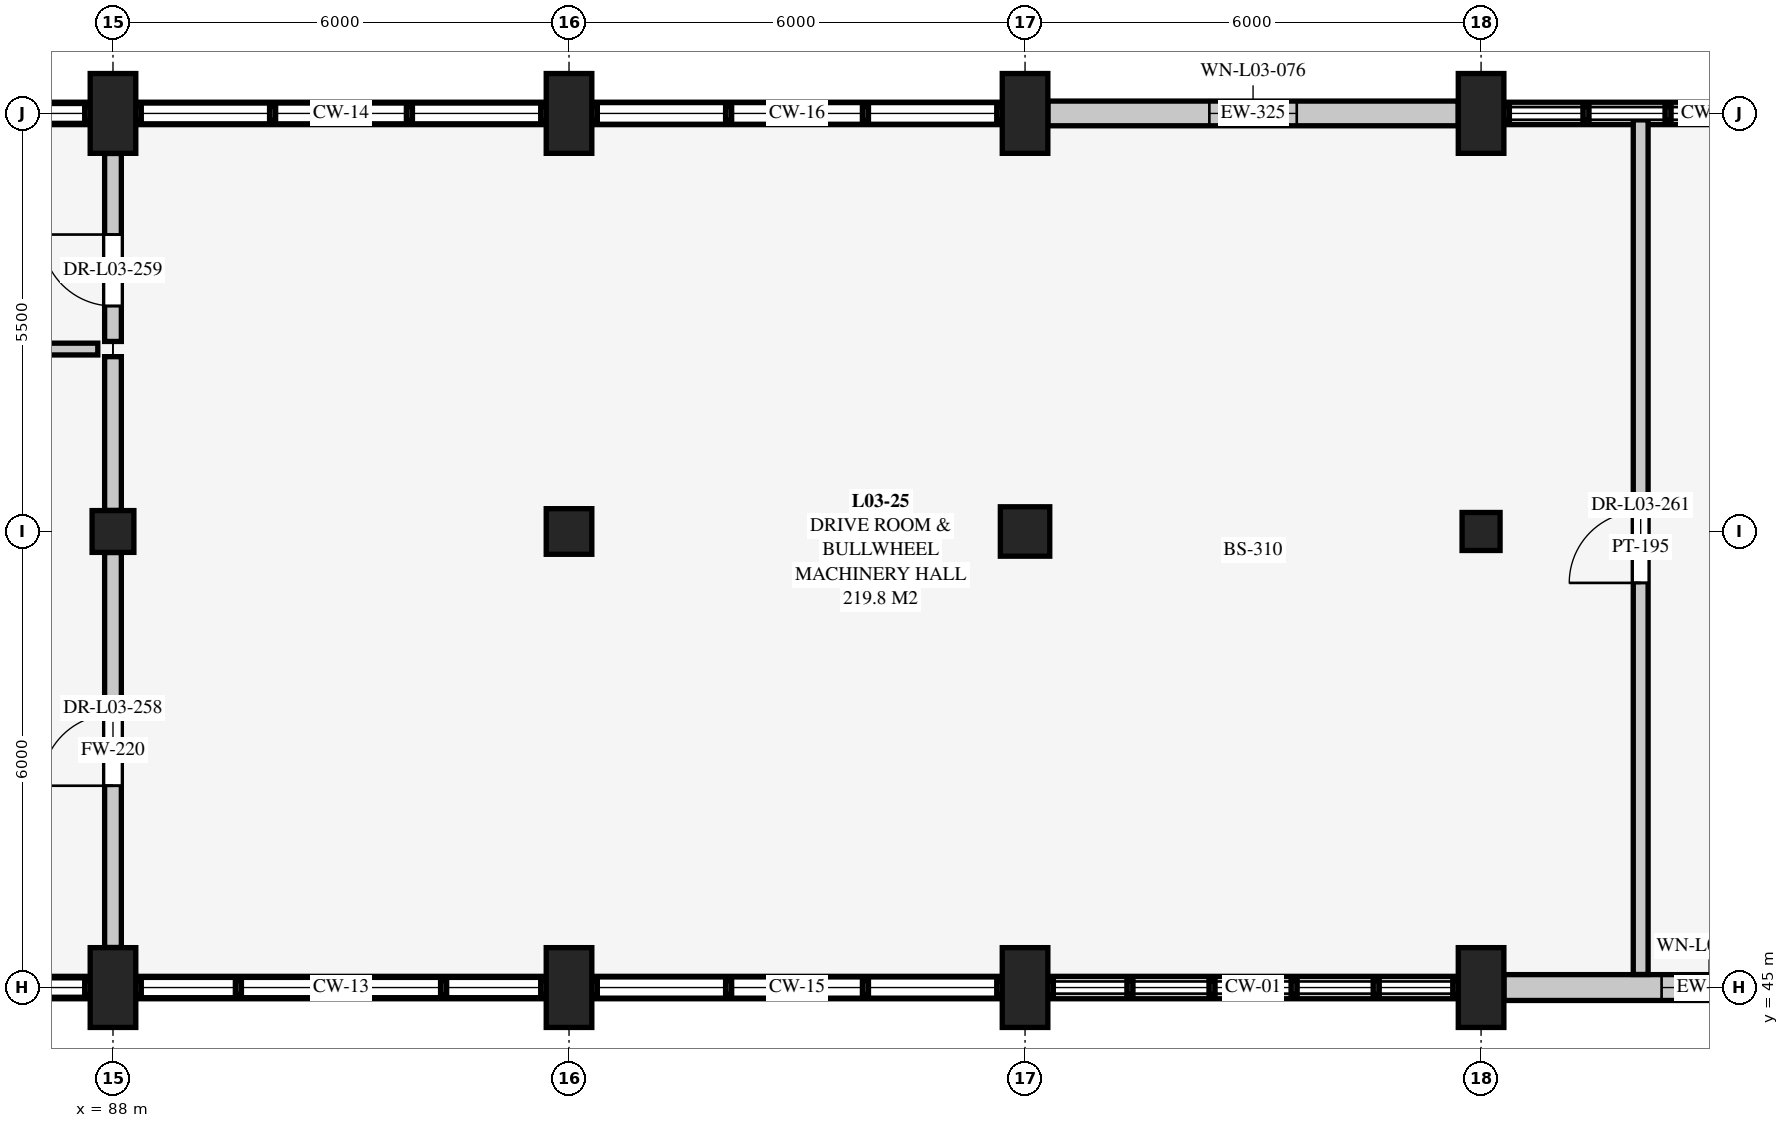
"""IFC4 building model, lengths in metres.
Left out: names, types, materials, properties, quantities, classifications, styles, units other than length and angle.
Written with IfcOpenShell. Run it as: python <this file> out.ifc"""

import sys

from ifc_helpers import new_model, si_unit, direction, frame, frame_2d, origin, origin_2d, place, context, subcontext, project, spatial, rectangle, extrude, element, fill, save


model = new_model("IFC4")
c1 = context("Model", 3, precision=1e-05, world=origin(), true_north=direction((0.0, 1.0)))
c2 = subcontext(c1, "Body", "Model", "MODEL_VIEW")
j1 = project(units=[si_unit("LENGTHUNIT", "METRE"), si_unit("PLANEANGLEUNIT", "RADIAN")], contexts=[c1])
p1 = place(None, origin())
s1 = spatial("IfcSite", under=j1, at=p1, CompositionType="ELEMENT")
p2 = place(p1, origin())
s2 = spatial("IfcBuilding", under=s1, at=p2, CompositionType="ELEMENT")
p3 = place(p2, frame((0.0, 0.0, 9.0)))
s3 = spatial("IfcBuildingStorey", under=s2, at=p3, CompositionType="ELEMENT", Elevation=9.0)
p4 = place(p3, frame((88.0, 45.0, 0.0), z_axis=(0.0, 0.0, 1.0), x_axis=(1.0, 0.0, 0.0)))
e1 = element("IfcColumn", 1, at=p4, inside=s3, PredefinedType="PILASTER", context=c2, shape_type="SweptSolid", body=[
    extrude(rectangle(XDim=0.6, YDim=1.05, at=origin_2d()), origin(), (0.0, 0.0, 1.0), 4.5),
])
p5 = place(p3, frame((88.0, 51.0, 0.0), z_axis=(0.0, 0.0, 1.0), x_axis=(1.0, 0.0, 0.0)))
e2 = element("IfcColumn", 2, at=p5, inside=s3, PredefinedType="COLUMN", context=c2, shape_type="SweptSolid", body=[
    extrude(rectangle(XDim=0.55, YDim=0.55, at=origin_2d()), origin(), (0.0, 0.0, 1.0), 4.5),
])
for number, where, z_axis, x_axis in (
    (3, (88.0, 56.5, 0.0), (0.0, 0.0, 1.0), (1.0, 0.0, 0.0)),
    (4, (94.0, 45.0, 0.0), (0.0, 0.0, 1.0), (1.0, 0.0, 0.0)),
):
    element("IfcColumn", number, at=place(p3, frame(where, z_axis=z_axis, x_axis=x_axis)), inside=s3, PredefinedType="PILASTER", context=c2, shape_type="SweptSolid", body=[
        extrude(rectangle(XDim=0.6, YDim=1.05, at=origin_2d()), origin(), (0.0, 0.0, 1.0), 4.5),
    ])
p6 = place(p3, frame((94.0, 51.0, 0.0), z_axis=(0.0, 0.0, 1.0), x_axis=(1.0, 0.0, 0.0)))
e5 = element("IfcColumn", 5, at=p6, inside=s3, PredefinedType="COLUMN", context=c2, shape_type="SweptSolid", body=[
    extrude(rectangle(XDim=0.6, YDim=0.6, at=origin_2d()), origin(), (0.0, 0.0, 1.0), 4.5),
])
for number, where, z_axis, x_axis in (
    (6, (94.0, 56.5, 0.0), (0.0, 0.0, 1.0), (1.0, 0.0, 0.0)),
    (7, (100.0, 45.0, 0.0), (0.0, 0.0, 1.0), (1.0, 0.0, 0.0)),
):
    element("IfcColumn", number, at=place(p3, frame(where, z_axis=z_axis, x_axis=x_axis)), inside=s3, PredefinedType="PILASTER", context=c2, shape_type="SweptSolid", body=[
        extrude(rectangle(XDim=0.6, YDim=1.05, at=origin_2d()), origin(), (0.0, 0.0, 1.0), 4.5),
    ])
p7 = place(p3, frame((100.0, 51.0, 0.0), z_axis=(0.0, 0.0, 1.0), x_axis=(1.0, 0.0, 0.0)))
e8 = element("IfcColumn", 8, at=p7, inside=s3, PredefinedType="COLUMN", context=c2, shape_type="SweptSolid", body=[
    extrude(rectangle(XDim=0.65, YDim=0.65, at=origin_2d()), origin(), (0.0, 0.0, 1.0), 4.5),
])
for number, where, z_axis, x_axis in (
    (9, (100.0, 56.5, 0.0), (0.0, 0.0, 1.0), (1.0, 0.0, 0.0)),
    (10, (106.0, 45.0, 0.0), (0.0, 0.0, 1.0), (1.0, 0.0, 0.0)),
):
    element("IfcColumn", number, at=place(p3, frame(where, z_axis=z_axis, x_axis=x_axis)), inside=s3, PredefinedType="PILASTER", context=c2, shape_type="SweptSolid", body=[
        extrude(rectangle(XDim=0.6, YDim=1.05, at=origin_2d()), origin(), (0.0, 0.0, 1.0), 4.5),
    ])
p8 = place(p3, frame((106.0, 51.0, 0.0), z_axis=(0.0, 0.0, 1.0), x_axis=(1.0, 0.0, 0.0)))
e11 = element("IfcColumn", 11, at=p8, inside=s3, PredefinedType="COLUMN", context=c2, shape_type="SweptSolid", body=[
    extrude(rectangle(XDim=0.5, YDim=0.5, at=origin_2d()), origin(), (0.0, 0.0, 1.0), 4.5),
])
p9 = place(p3, frame((106.0, 56.5, 0.0), z_axis=(0.0, 0.0, 1.0), x_axis=(1.0, 0.0, 0.0)))
e12 = element("IfcColumn", 12, at=p9, inside=s3, PredefinedType="PILASTER", context=c2, shape_type="SweptSolid", body=[
    extrude(rectangle(XDim=0.6, YDim=1.05, at=origin_2d()), origin(), (0.0, 0.0, 1.0), 4.5),
])
p10 = place(p3, frame((87.7, 45.0, 0.0), z_axis=(0.0, 0.0, 1.0), x_axis=(-1.0, 0.0, 0.0)))
e13 = element("IfcWall", 13, at=p10, inside=s3, PredefinedType="SOLIDWALL", context=c2, shape_type="SweptSolid", body=[
    extrude(rectangle(XDim=5.4, YDim=0.295, at=frame_2d((2.7, 0.0))), origin(), (0.0, 0.0, 1.0), 0.26),
])
p11 = place(p3, frame((82.3, 56.5, 0.0), z_axis=(0.0, 0.0, 1.0), x_axis=(1.0, 0.0, 0.0)))
e14 = element("IfcWall", 14, at=p11, inside=s3, PredefinedType="SOLIDWALL", context=c2, shape_type="SweptSolid", body=[
    extrude(rectangle(XDim=5.4, YDim=0.295, at=frame_2d((2.7, 0.0))), origin(), (0.0, 0.0, 1.0), 0.31),
])
p12 = place(p3, frame((93.7, 45.0, 0.0), z_axis=(0.0, 0.0, 1.0), x_axis=(-1.0, 0.0, 0.0)))
e15 = element("IfcWall", 15, at=p12, inside=s3, PredefinedType="SOLIDWALL", context=c2, shape_type="SweptSolid", body=[
    extrude(rectangle(XDim=5.4, YDim=0.295, at=frame_2d((2.7, 0.0))), origin(), (0.0, 0.0, 1.0), 0.36),
])
p13 = place(p3, frame((88.3, 56.5, 0.0), z_axis=(0.0, 0.0, 1.0), x_axis=(1.0, 0.0, 0.0)))
e16 = element("IfcWall", 16, at=p13, inside=s3, PredefinedType="SOLIDWALL", context=c2, shape_type="SweptSolid", body=[
    extrude(rectangle(XDim=5.4, YDim=0.295, at=frame_2d((2.7, 0.0))), origin(), (0.0, 0.0, 1.0), 0.41),
])
p14 = place(p3, frame((99.7, 45.0, 0.0), z_axis=(0.0, 0.0, 1.0), x_axis=(-1.0, 0.0, 0.0)))
e17 = element("IfcWall", 17, at=p14, inside=s3, PredefinedType="SOLIDWALL", context=c2, shape_type="SweptSolid", body=[
    extrude(rectangle(XDim=5.4, YDim=0.295, at=frame_2d((2.7, 0.0))), origin(), (0.0, 0.0, 1.0), 0.46),
])
p15 = place(p3, frame((94.3, 56.5, 0.0), z_axis=(0.0, 0.0, 1.0), x_axis=(1.0, 0.0, 0.0)))
e18 = element("IfcWall", 18, at=p15, inside=s3, PredefinedType="SOLIDWALL", context=c2, shape_type="SweptSolid", body=[
    extrude(rectangle(XDim=5.4, YDim=0.295, at=frame_2d((2.7, 0.0))), origin(), (0.0, 0.0, 1.0), 0.52),
])
p16 = place(p3, frame((105.7, 45.0, 0.0), z_axis=(0.0, 0.0, 1.0), x_axis=(-1.0, 0.0, 0.0)))
e19 = element("IfcWall", 19, at=p16, inside=s3, PredefinedType="SOLIDWALL", context=c2, shape_type="SweptSolid", body=[
    extrude(rectangle(XDim=5.4, YDim=0.295, at=frame_2d((2.7, 0.0))), origin(), (0.0, 0.0, 1.0), 0.16),
])
p17 = place(p3, frame((100.3, 56.5, 0.0), z_axis=(0.0, 0.0, 1.0), x_axis=(1.0, 0.0, 0.0)))
e20 = element("IfcWall", 20, at=p17, inside=s3, PredefinedType="SOLIDWALL", context=c2, shape_type="SweptSolid", body=[
    extrude(rectangle(XDim=5.4, YDim=0.325, at=frame_2d((2.7, 0.0))), origin(), (0.0, 0.0, 1.0), 3.845),
])
p18 = place(p17, frame((2.125, 0.0, 0.85)))
e21 = element("IfcOpeningElement", 21, at=p18, cuts=e20, PredefinedType="OPENING", context=c2, shape_type="SweptSolid", body=[
    extrude(rectangle(XDim=1.15, YDim=2.05, at=frame_2d((0.575, 1.025))), frame((0.0, 0.173, 0.0), z_axis=(0.0, -1.0, 0.0), x_axis=(1.0, 0.0, 0.0)), (0.0, 0.0, 1.0), 0.345),
])
p19 = place(p3, frame((111.7, 45.0, 0.0), z_axis=(0.0, 0.0, 1.0), x_axis=(-1.0, 0.0, 0.0)))
e22 = element("IfcWall", 22, at=p19, inside=s3, PredefinedType="SOLIDWALL", context=c2, shape_type="SweptSolid", body=[
    extrude(rectangle(XDim=5.4, YDim=0.34, at=frame_2d((2.7, 0.0))), origin(), (0.0, 0.0, 1.0), 3.845),
])
p20 = place(p19, frame((2.075, 0.0, 0.8)))
e23 = element("IfcOpeningElement", 23, at=p20, cuts=e22, PredefinedType="OPENING", context=c2, shape_type="SweptSolid", body=[
    extrude(rectangle(XDim=1.25, YDim=2.15, at=frame_2d((0.625, 1.075))), frame((0.0, 0.18, 0.0), z_axis=(0.0, -1.0, 0.0), x_axis=(1.0, 0.0, 0.0)), (0.0, 0.0, 1.0), 0.36),
])
p21 = place(p3, frame((106.3, 56.5, 0.0), z_axis=(0.0, 0.0, 1.0), x_axis=(1.0, 0.0, 0.0)))
e24 = element("IfcWall", 24, at=p21, inside=s3, PredefinedType="SOLIDWALL", context=c2, shape_type="SweptSolid", body=[
    extrude(rectangle(XDim=5.4, YDim=0.295, at=frame_2d((2.7, 0.0))), origin(), (0.0, 0.0, 1.0), 0.21),
])
p22 = place(p3, frame((64.2, 53.4, 0.0), z_axis=(0.0, 0.0, 1.0), x_axis=(1.0, 0.0, 0.0)))
e25 = element("IfcWall", 25, at=p22, inside=s3, PredefinedType="PARTITIONING", context=c2, shape_type="SweptSolid", body=[
    extrude(rectangle(XDim=23.6, YDim=0.155, at=frame_2d((11.8, 0.0))), origin(), (0.0, 0.0, 1.0), 4.252),
])
p23 = place(p22, frame((11.01, 0.0, 0.0)))
e26 = element("IfcOpeningElement", 26, at=p23, cuts=e25, PredefinedType="OPENING", context=c2, shape_type="SweptSolid", body=[
    extrude(rectangle(XDim=1.58, YDim=2.2, at=frame_2d((0.79, 1.1))), frame((0.0, 0.088, 0.0), z_axis=(0.0, -1.0, 0.0), x_axis=(1.0, 0.0, 0.0)), (0.0, 0.0, 1.0), 0.175),
])
p24 = place(p3, frame((88.0, 45.527, 0.0), z_axis=(0.0, 0.0, 1.0), x_axis=(0.0, 1.0, 0.0)))
e27 = element("IfcWall", 27, at=p24, inside=s3, PredefinedType="SOLIDWALL", context=c2, shape_type="SweptSolid", body=[
    extrude(rectangle(XDim=5.196, YDim=0.22, at=frame_2d((2.598, 0.0))), origin(), (0.0, 0.0, 1.0), 3.644),
])
p25 = place(p24, frame((2.128, 0.0, 0.0)))
e28 = element("IfcOpeningElement", 28, at=p25, cuts=e27, PredefinedType="OPENING", context=c2, shape_type="SweptSolid", body=[
    extrude(rectangle(XDim=0.94, YDim=2.1, at=frame_2d((0.47, 1.05))), frame((0.0, 0.12, 0.0), z_axis=(0.0, -1.0, 0.0), x_axis=(1.0, 0.0, 0.0)), (0.0, 0.0, 1.0), 0.24),
])
p26 = place(p3, frame((88.0, 51.277, 0.0), z_axis=(0.0, 0.0, 1.0), x_axis=(0.0, 1.0, 0.0)))
e29 = element("IfcWall", 29, at=p26, inside=s3, PredefinedType="SOLIDWALL", context=c2, shape_type="SweptSolid", body=[
    extrude(rectangle(XDim=2.023, YDim=0.22, at=frame_2d((1.011, 0.0))), origin(), (0.0, 0.0, 1.0), 3.795),
])
p27 = place(p3, frame((88.0, 53.5, 0.0), z_axis=(0.0, 0.0, 1.0), x_axis=(0.0, 1.0, 0.0)))
e30 = element("IfcWall", 30, at=p27, inside=s3, PredefinedType="SOLIDWALL", context=c2, shape_type="SweptSolid", body=[
    extrude(rectangle(XDim=2.473, YDim=0.22, at=frame_2d((1.236, 0.0))), origin(), (0.0, 0.0, 1.0), 3.795),
])
p28 = place(p27, frame((0.467, 0.0, 0.0)))
e31 = element("IfcOpeningElement", 31, at=p28, cuts=e30, PredefinedType="OPENING", context=c2, shape_type="SweptSolid", body=[
    extrude(rectangle(XDim=0.94, YDim=2.1, at=frame_2d((0.47, 1.05))), frame((0.0, 0.12, 0.0), z_axis=(0.0, -1.0, 0.0), x_axis=(1.0, 0.0, 0.0)), (0.0, 0.0, 1.0), 0.24),
])
p29 = place(p3, frame((108.1, 45.172, 0.0), z_axis=(0.0, 0.0, 1.0), x_axis=(0.0, 1.0, 0.0)))
e32 = element("IfcWall", 32, at=p29, inside=s3, PredefinedType="PARTITIONING", context=c2, shape_type="SweptSolid", body=[
    extrude(rectangle(XDim=11.243, YDim=0.195, at=frame_2d((5.622, 0.0))), origin(), (0.0, 0.0, 1.0), 4.252),
])
p30 = place(p29, frame((5.152, 0.0, 0.0)))
e33 = element("IfcOpeningElement", 33, at=p30, cuts=e32, PredefinedType="OPENING", context=c2, shape_type="SweptSolid", body=[
    extrude(rectangle(XDim=0.94, YDim=2.1, at=frame_2d((0.47, 1.05))), frame((0.0, 0.108, 0.0), z_axis=(0.0, -1.0, 0.0), x_axis=(1.0, 0.0, 0.0)), (0.0, 0.0, 1.0), 0.215),
])
p31 = place(p18, origin())
e34 = element("IfcWindow", 34, at=p31, inside=s3, PartitioningType="SINGLE_PANEL", PredefinedType="WINDOW", context=c2, shape_type="SweptSolid", body=[
    extrude(rectangle(XDim=1.15, YDim=2.05, at=frame_2d((0.575, 1.025))), frame((0.0, 0.03, 0.0), z_axis=(0.0, -1.0, 0.0), x_axis=(1.0, 0.0, 0.0)), (0.0, 0.0, 1.0), 0.06),
])
fill(e21, e34)
p32 = place(p20, origin())
e35 = element("IfcWindow", 35, at=p32, inside=s3, PartitioningType="SINGLE_PANEL", PredefinedType="WINDOW", context=c2, shape_type="SweptSolid", body=[
    extrude(rectangle(XDim=1.25, YDim=2.15, at=frame_2d((0.625, 1.075))), frame((0.0, 0.03, 0.0), z_axis=(0.0, -1.0, 0.0), x_axis=(1.0, 0.0, 0.0)), (0.0, 0.0, 1.0), 0.06),
])
fill(e23, e35)
p33 = place(p25, origin())
e36 = element("IfcDoor", 36, at=p33, inside=s3, OperationType="SINGLE_SWING_LEFT", PredefinedType="DOOR", context=c2, shape_type="SweptSolid", body=[
    extrude(rectangle(XDim=0.94, YDim=2.1, at=frame_2d((0.47, 1.05))), frame((0.0, 0.025, 0.0), z_axis=(0.0, -1.0, 0.0), x_axis=(1.0, 0.0, 0.0)), (0.0, 0.0, 1.0), 0.05),
])
fill(e28, e36)
p34 = place(p28, origin())
e37 = element("IfcDoor", 37, at=p34, inside=s3, OperationType="SINGLE_SWING_RIGHT", PredefinedType="DOOR", context=c2, shape_type="SweptSolid", body=[
    extrude(rectangle(XDim=0.94, YDim=2.1, at=frame_2d((0.47, 1.05))), frame((0.0, 0.025, 0.0), z_axis=(0.0, -1.0, 0.0), x_axis=(1.0, 0.0, 0.0)), (0.0, 0.0, 1.0), 0.05),
])
fill(e31, e37)
p35 = place(p30, origin())
e38 = element("IfcDoor", 38, at=p35, inside=s3, OperationType="SINGLE_SWING_LEFT", PredefinedType="DOOR", context=c2, shape_type="SweptSolid", body=[
    extrude(rectangle(XDim=0.94, YDim=2.1, at=frame_2d((0.47, 1.05))), frame((0.0, 0.025, 0.0), z_axis=(0.0, -1.0, 0.0), x_axis=(1.0, 0.0, 0.0)), (0.0, 0.0, 1.0), 0.05),
])
fill(e33, e38)
save(model, sys.argv[1])
